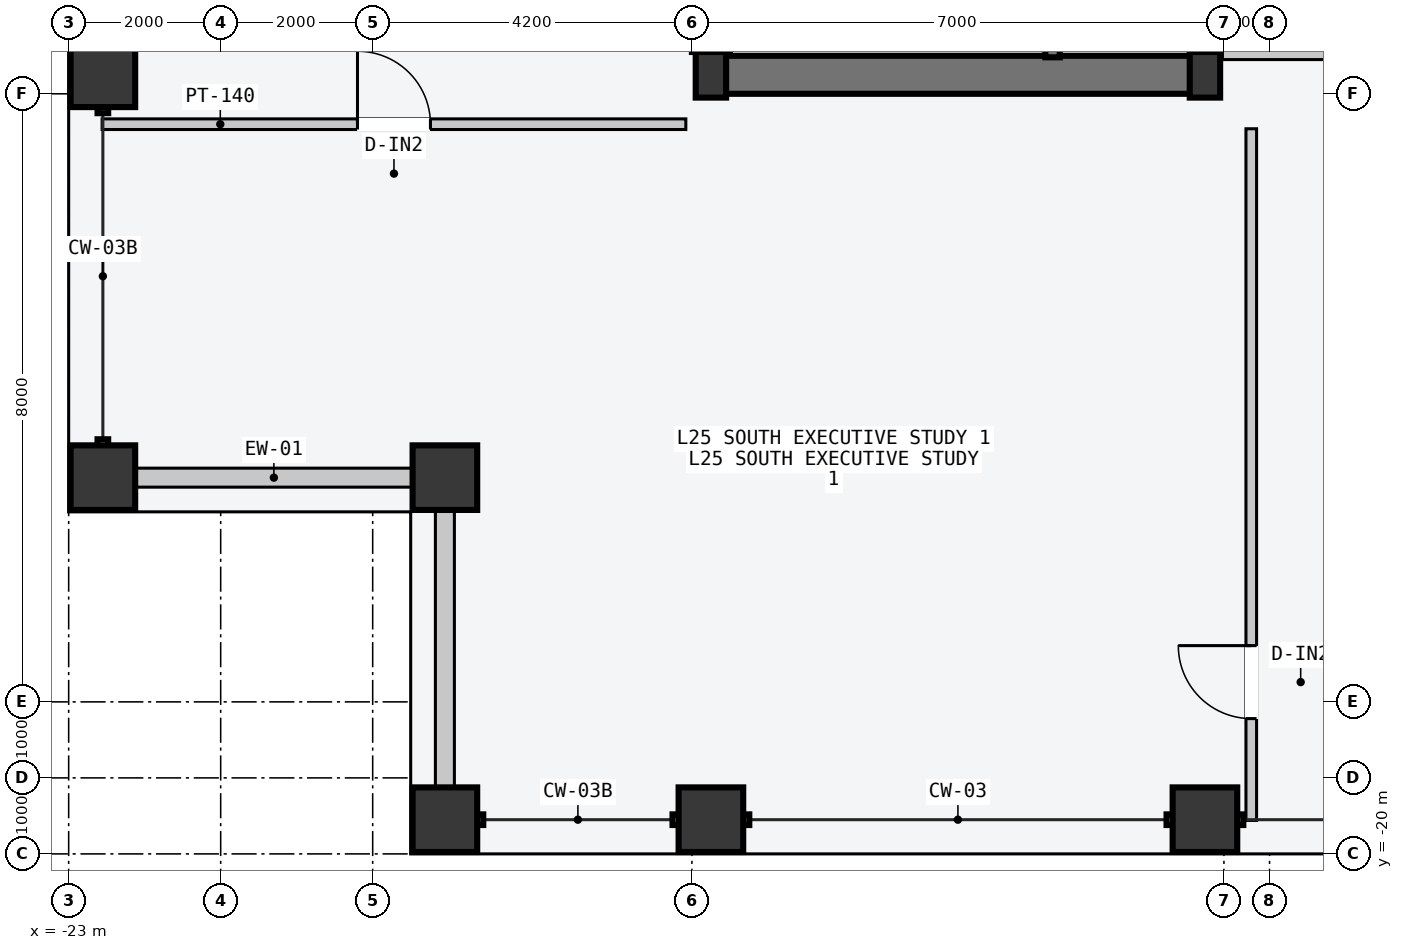
"""IFC4 building model, lengths in metres.
Left out: names, types, materials, properties, quantities, classifications, styles, units other than length and angle.
Written with IfcOpenShell. Run it as: python <this file> out.ifc"""

import sys

from ifc_helpers import new_model, si_unit, direction, frame, frame_2d, origin, origin_2d, place, context, subcontext, project, spatial, rectangle, hollow_rectangle, i_section, extrude, element, fill, save


model = new_model("IFC4")
c1 = context("Model", 3, precision=1e-05, world=origin(), true_north=direction((0.0, 1.0)))
c2 = subcontext(c1, "Body", "Model", "MODEL_VIEW")
j1 = project(units=[si_unit("LENGTHUNIT", "METRE"), si_unit("PLANEANGLEUNIT", "RADIAN")], contexts=[c1])
p1 = place(None, origin())
s1 = spatial("IfcSite", under=j1, at=p1, CompositionType="ELEMENT")
p2 = place(p1, origin())
s2 = spatial("IfcBuilding", under=s1, at=p2, CompositionType="ELEMENT")
p3 = place(p2, frame((0.0, 0.0, 99.0)))
s3 = spatial("IfcBuildingStorey", under=s2, at=p3, CompositionType="ELEMENT", Elevation=99.0)
p4 = place(p3, frame((-14.53, -9.75, -0.2), z_axis=(0.0, 0.0, 1.0), x_axis=(1.0, 0.0, 0.0)))
e1 = element("IfcWall", 1, at=p4, inside=s3, PredefinedType="SHEAR", context=c2, shape_type="SweptSolid", body=[
    extrude(rectangle(XDim=6.46, YDim=0.5, at=frame_2d((3.23, 0.0))), origin(), (0.0, 0.0, 1.0), 3.6),
])
for number, where, z_axis, x_axis in (
    (2, (-14.55, -9.75, 0.0), (0.0, 0.0, 1.0), (1.0, 0.0, 0.0)),
    (3, (-8.05, -9.75, 0.0), (0.0, 0.0, 1.0), (1.0, 0.0, 0.0)),
):
    element("IfcColumn", number, at=place(p3, frame(where, z_axis=z_axis, x_axis=x_axis)), inside=s3, PredefinedType="COLUMN", context=c2, shape_type="SweptSolid", body=[
        extrude(i_section(OverallWidth=0.4, OverallDepth=0.6, WebThickness=0.022, FlangeThickness=0.036, at=origin_2d()), origin(), (0.0, 0.0, 1.0), 3.6),
    ])
for number, where, z_axis, x_axis in (
    (4, (-18.05, -19.55, 0.0), (0.0, 0.0, 1.0), (1.0, 0.0, 0.0)),
    (5, (-14.55, -19.55, 0.0), (0.0, 0.0, 1.0), (1.0, 0.0, 0.0)),
    (6, (-8.05, -19.55, 0.0), (0.0, 0.0, 1.0), (1.0, 0.0, 0.0)),
    (7, (-22.55, -15.05, 0.0), (0.0, 0.0, 1.0), (0.0, 1.0, 0.0)),
    (8, (-22.55, -9.75, 0.0), (0.0, 0.0, 1.0), (0.0, 1.0, 0.0)),
    (9, (-18.05, -15.05, 0.0), (0.0, 0.0, 1.0), (1.0, 0.0, 0.0)),
):
    element("IfcColumn", number, at=place(p3, frame(where, z_axis=z_axis, x_axis=x_axis)), inside=s3, PredefinedType="COLUMN", context=c2, shape_type="SweptSolid", body=[
        extrude(hollow_rectangle(XDim=0.85, YDim=0.85, WallThickness=0.04, at=origin_2d()), origin(), (0.0, 0.0, 1.0), 3.6),
    ])
for number, where, z_axis, x_axis in (
    (10, (-22.115, -15.05, 0.0), (0.0, 0.0, 1.0), (1.0, 0.0, 0.0)),
    (11, (-18.05, -19.115, 0.0), (0.0, 0.0, 1.0), (0.0, 1.0, 0.0)),
):
    element("IfcWall", number, at=place(p3, frame(where, z_axis=z_axis, x_axis=x_axis)), inside=s3, PredefinedType="STANDARD", context=c2, shape_type="SweptSolid", body=[
        extrude(rectangle(XDim=3.63, YDim=0.25, at=frame_2d((1.815, 0.0))), origin(), (0.0, 0.0, 1.0), 2.75),
    ])
for number, where, z_axis, x_axis in (
    (12, (-8.045, -9.52, -0.2), (0.0, 0.0, 1.0), (0.0, 1.0, 0.0)),
    (13, (-10.055, -9.52, -0.2), (0.0, 0.0, 1.0), (0.0, 1.0, 0.0)),
):
    element("IfcWall", number, at=place(p3, frame(where, z_axis=z_axis, x_axis=x_axis)), inside=s3, PredefinedType="SOLIDWALL", context=c2, shape_type="SweptSolid", body=[
        extrude(rectangle(XDim=2.12, YDim=0.19, at=frame_2d((1.06, 0.0))), origin(), (0.0, 0.0, 1.0), 3.6),
    ])
p5 = place(p3, frame((-6.02, -9.45, 0.0), z_axis=(0.0, 0.0, 1.0), x_axis=(-1.0, 0.0, 0.0)))
e14 = element("IfcWall", 14, at=p5, inside=s3, PredefinedType="PARTITIONING", context=c2, shape_type="SweptSolid", body=[
    extrude(rectangle(XDim=1.8, YDim=0.2, at=frame_2d((0.9, 0.0))), origin(), (0.0, 0.0, 1.0), 3.4),
])
p6 = place(p3, frame((-7.44, -19.56, 0.0), z_axis=(0.0, 0.0, 1.0), x_axis=(0.0, 1.0, 0.0)))
e15 = element("IfcWall", 15, at=p6, inside=s3, PredefinedType="PARTITIONING", context=c2, shape_type="SweptSolid", body=[
    extrude(rectangle(XDim=9.1, YDim=0.14, at=frame_2d((4.55, 0.0))), origin(), (0.0, 0.0, 1.0), 3.4),
])
p7 = place(p6, frame((1.34, 0.0, 0.0)))
e16 = element("IfcOpeningElement", 16, at=p7, cuts=e15, PredefinedType="OPENING", context=c2, shape_type="SweptSolid", body=[
    extrude(rectangle(XDim=0.96, YDim=2.18, at=frame_2d((0.48, 1.09))), frame((0.0, 0.08, 0.0), z_axis=(0.0, -1.0, 0.0), x_axis=(1.0, 0.0, 0.0)), (0.0, 0.0, 1.0), 0.16),
])
p8 = place(p3, frame((-22.56, -10.4, 0.0), z_axis=(0.0, 0.0, 1.0), x_axis=(1.0, 0.0, 0.0)))
e17 = element("IfcWall", 17, at=p8, inside=s3, PredefinedType="PARTITIONING", context=c2, shape_type="SweptSolid", body=[
    extrude(rectangle(XDim=7.68, YDim=0.14, at=frame_2d((3.84, 0.0))), origin(), (0.0, 0.0, 1.0), 3.4),
])
p9 = place(p8, frame((3.36, 0.0, 0.0)))
e18 = element("IfcOpeningElement", 18, at=p9, cuts=e17, PredefinedType="OPENING", context=c2, shape_type="SweptSolid", body=[
    extrude(rectangle(XDim=0.96, YDim=2.18, at=frame_2d((0.48, 1.09))), frame((0.0, 0.08, 0.0), z_axis=(0.0, -1.0, 0.0), x_axis=(1.0, 0.0, 0.0)), (0.0, 0.0, 1.0), 0.16),
])
p10 = place(p7, origin())
e19 = element("IfcDoor", 19, at=p10, inside=s3, OperationType="SINGLE_SWING_RIGHT", PredefinedType="DOOR", context=c2, shape_type="SweptSolid", body=[
    extrude(rectangle(XDim=0.96, YDim=2.18, at=frame_2d((0.48, 1.09))), frame((0.0, 0.025, 0.0), z_axis=(0.0, -1.0, 0.0), x_axis=(1.0, 0.0, 0.0)), (0.0, 0.0, 1.0), 0.05),
])
fill(e16, e19)
p11 = place(p9, origin())
e20 = element("IfcDoor", 20, at=p11, inside=s3, OperationType="SINGLE_SWING_LEFT", PredefinedType="DOOR", context=c2, shape_type="SweptSolid", body=[
    extrude(rectangle(XDim=0.96, YDim=2.18, at=frame_2d((0.48, 1.09))), frame((0.0, 0.025, 0.0), z_axis=(0.0, -1.0, 0.0), x_axis=(1.0, 0.0, 0.0)), (0.0, 0.0, 1.0), 0.05),
])
fill(e18, e20)
save(model, sys.argv[1])
